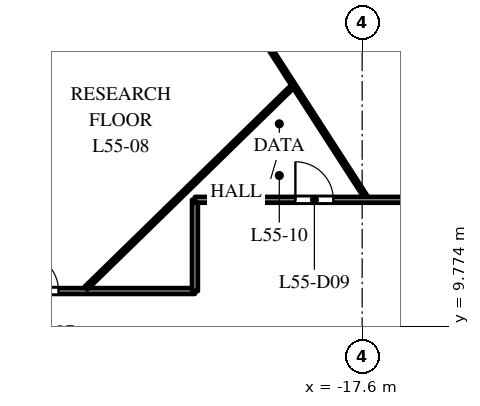
"""IFC4 building model, lengths in metres.
Left out: names, types, materials, properties, quantities, classifications, styles, units other than length and angle.
Written with IfcOpenShell. Run it as: python <this file> out.ifc"""

import sys

from ifc_helpers import new_model, si_unit, direction, frame, frame_2d, origin, place, context, subcontext, project, spatial, rectangle, extrude, element, fill, save


model = new_model("IFC4")
c1 = context("Model", 3, precision=1e-05, world=origin(), true_north=direction((0.0, 1.0)))
c2 = subcontext(c1, "Body", "Model", "MODEL_VIEW")
j1 = project(units=[si_unit("LENGTHUNIT", "METRE"), si_unit("PLANEANGLEUNIT", "RADIAN")], contexts=[c1])
p1 = place(None, origin())
s1 = spatial("IfcSite", under=j1, at=p1, CompositionType="ELEMENT")
p2 = place(p1, origin())
s2 = spatial("IfcBuilding", under=s1, at=p2, CompositionType="ELEMENT")
p3 = place(p2, frame((0.0, 0.0, 261.5)))
s3 = spatial("IfcBuildingStorey", under=s2, at=p3, CompositionType="ELEMENT", Elevation=261.5)
p4 = place(p3, frame((-31.5, 10.7, 0.0), z_axis=(0.0, 0.0, 1.0), x_axis=(1.0, 0.0, 0.0)))
e1 = element("IfcWall", 1, at=p4, inside=s3, PredefinedType="PARTITIONING", context=c2, shape_type="SweptSolid", body=[
    extrude(rectangle(XDim=9.5, YDim=0.15, at=frame_2d((4.75, 0.0))), origin(), (0.0, 0.0, 1.0), 3.1),
])
p5 = place(p4, frame((4.91, 0.0, 0.0)))
e2 = element("IfcOpeningElement", 2, at=p5, cuts=e1, PredefinedType="OPENING", context=c2, shape_type="SweptSolid", body=[
    extrude(rectangle(XDim=1.0, YDim=2.1, at=frame_2d((0.5, 1.05))), frame((0.0, 0.085, 0.0), z_axis=(0.0, -1.0, 0.0), x_axis=(1.0, 0.0, 0.0)), (0.0, 0.0, 1.0), 0.17),
])
p6 = place(p3, frame((-24.866, 10.778, 0.0), z_axis=(0.0, 0.0, 1.0), x_axis=(0.715632814242, 0.698476681916, 0.0)))
e3 = element("IfcWall", 3, at=p6, inside=s3, PredefinedType="PARTITIONING", context=c2, shape_type="SweptSolid", body=[
    extrude(rectangle(XDim=7.585, YDim=0.1, at=frame_2d((3.792, 0.0))), origin(), (0.0, 0.0, 1.0), 2.75),
])
p7 = place(p3, frame((-22.905, 21.542, 0.0), z_axis=(0.0, 0.0, 1.0), x_axis=(0.542277075573, -0.840199722273, 0.0)))
e4 = element("IfcWall", 4, at=p7, inside=s3, PredefinedType="PARTITIONING", context=c2, shape_type="SweptSolid", body=[
    extrude(rectangle(XDim=9.958, YDim=0.1, at=frame_2d((4.979, 0.0))), origin(), (0.0, 0.0, 1.0), 3.0),
])
p8 = place(p3, frame((-22.0, 10.7, 0.0), z_axis=(0.0, 0.0, 1.0), x_axis=(0.0, 1.0, 0.0)))
e5 = element("IfcWall", 5, at=p8, inside=s3, PredefinedType="PARTITIONING", context=c2, shape_type="SweptSolid", body=[
    extrude(rectangle(XDim=2.4, YDim=0.15, at=frame_2d((1.2, 0.0))), origin(), (0.0, 0.0, 1.0), 3.7),
])
p9 = place(p3, frame((-22.0, 13.1, 0.0), z_axis=(0.0, 0.0, 1.0), x_axis=(1.0, 0.0, 0.0)))
e6 = element("IfcWall", 6, at=p9, inside=s3, PredefinedType="PARTITIONING", context=c2, shape_type="SweptSolid", body=[
    extrude(rectangle(XDim=17.507, YDim=0.15, at=frame_2d((8.753, 0.0))), origin(), (0.0, 0.0, 1.0), 2.75),
])
p10 = place(p9, frame((2.643, 0.0, 0.0)))
e7 = element("IfcOpeningElement", 7, at=p10, cuts=e6, PredefinedType="OPENING", context=c2, shape_type="SweptSolid", body=[
    extrude(rectangle(XDim=1.0, YDim=2.1, at=frame_2d((0.5, 1.05))), frame((0.0, 0.085, 0.0), z_axis=(0.0, -1.0, 0.0), x_axis=(1.0, 0.0, 0.0)), (0.0, 0.0, 1.0), 0.17),
])
p11 = place(p9, frame((15.877, 0.0, 0.0)))
e8 = element("IfcOpeningElement", 8, at=p11, cuts=e6, PredefinedType="OPENING", context=c2, shape_type="SweptSolid", body=[
    extrude(rectangle(XDim=1.0, YDim=2.1, at=frame_2d((0.5, 1.05))), frame((0.0, 0.085, 0.0), z_axis=(0.0, -1.0, 0.0), x_axis=(1.0, 0.0, 0.0)), (0.0, 0.0, 1.0), 0.17),
])
p12 = place(p5, origin())
e9 = element("IfcDoor", 9, at=p12, inside=s3, OperationType="SINGLE_SWING_LEFT", PredefinedType="DOOR", context=c2, shape_type="SweptSolid", body=[
    extrude(rectangle(XDim=1.0, YDim=2.1, at=frame_2d((0.5, 1.05))), frame((0.0, 0.025, 0.0), z_axis=(0.0, -1.0, 0.0), x_axis=(1.0, 0.0, 0.0)), (0.0, 0.0, 1.0), 0.05),
])
fill(e2, e9)
p13 = place(p10, origin())
e10 = element("IfcDoor", 10, at=p13, inside=s3, OperationType="SINGLE_SWING_LEFT", PredefinedType="DOOR", context=c2, shape_type="SweptSolid", body=[
    extrude(rectangle(XDim=1.0, YDim=2.1, at=frame_2d((0.5, 1.05))), frame((0.0, 0.025, 0.0), z_axis=(0.0, -1.0, 0.0), x_axis=(1.0, 0.0, 0.0)), (0.0, 0.0, 1.0), 0.05),
])
fill(e7, e10)
save(model, sys.argv[1])
